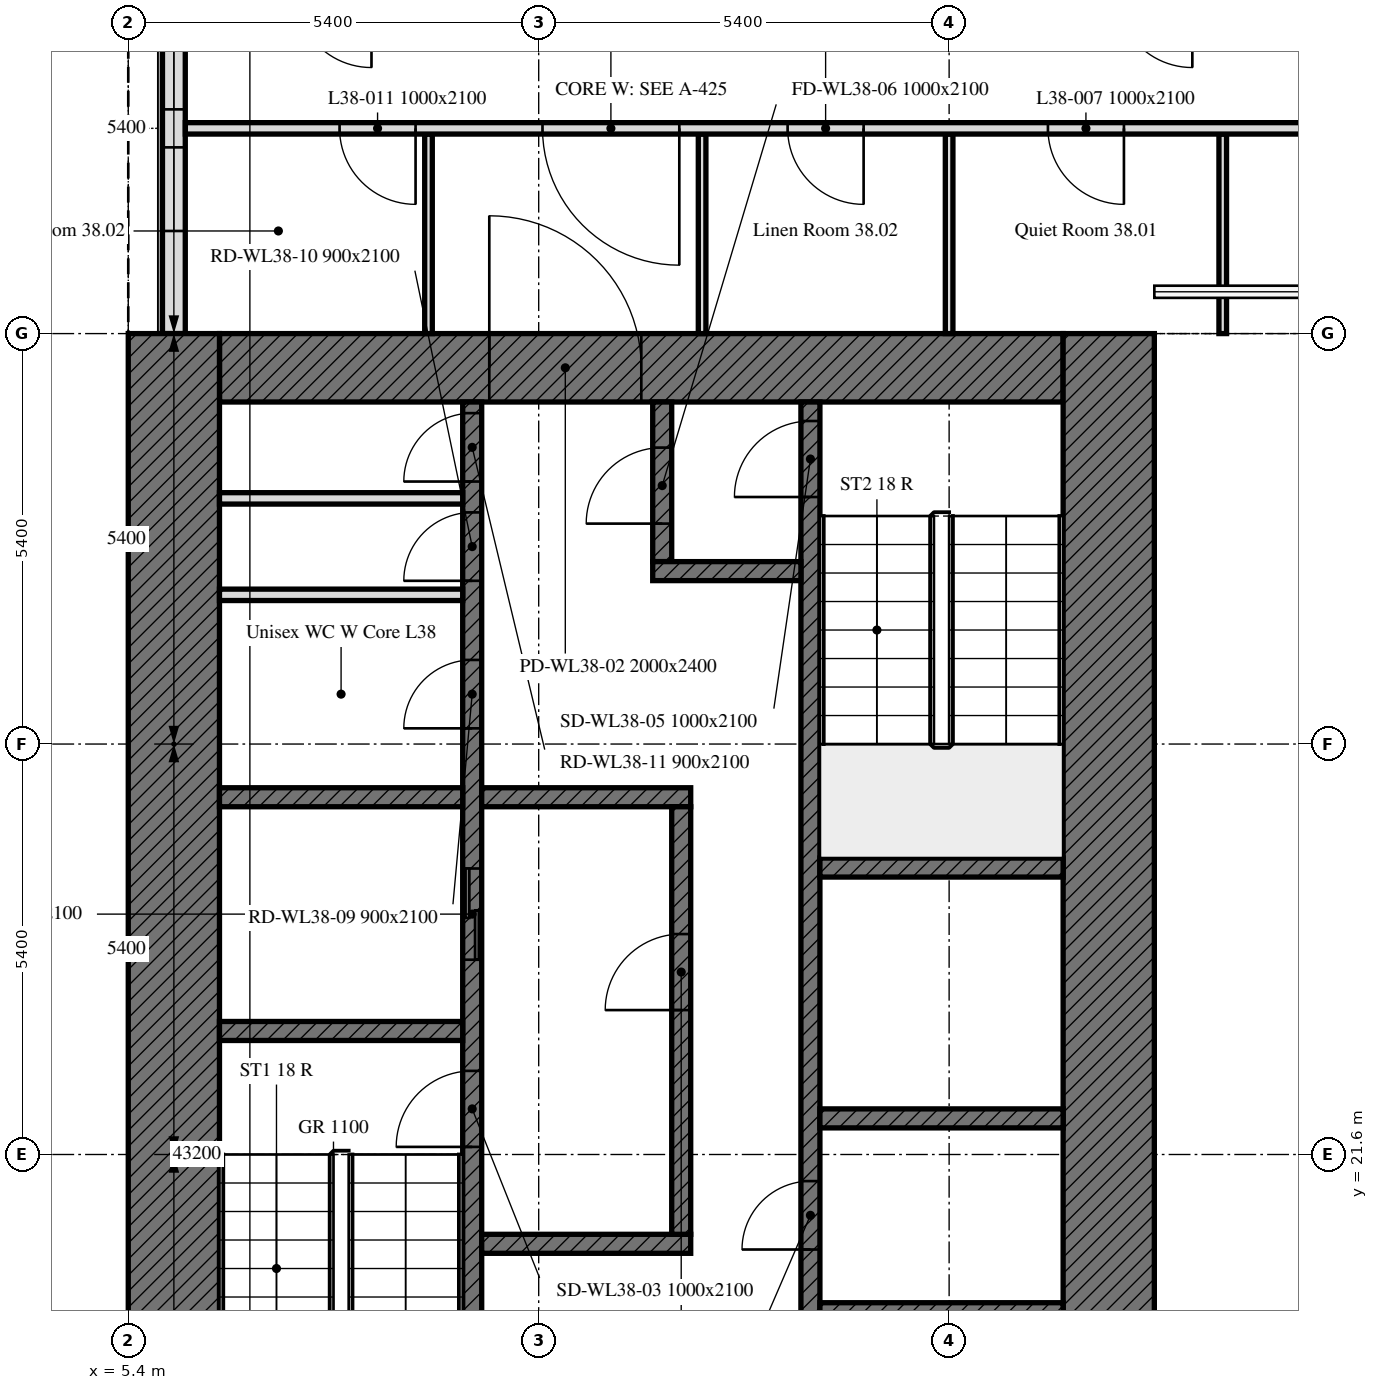
"""IFC4 building model, lengths in metres.
Left out: names, types, materials, properties, quantities, classifications, styles, units other than length and angle.
Written with IfcOpenShell. Run it as: python <this file> out.ifc"""

import sys

from ifc_helpers import new_model, si_unit, direction, frame, frame_2d, origin, place, context, subcontext, project, spatial, rectangle, extrude, element, fill, save


model = new_model("IFC4")
c1 = context("Model", 3, precision=1e-05, world=origin(), true_north=direction((0.0, 1.0)))
c2 = subcontext(c1, "Body", "Model", "MODEL_VIEW")
j1 = project(units=[si_unit("LENGTHUNIT", "METRE"), si_unit("PLANEANGLEUNIT", "RADIAN")], contexts=[c1])
p1 = place(None, origin())
s1 = spatial("IfcSite", under=j1, at=p1, CompositionType="ELEMENT")
p2 = place(p1, origin())
s2 = spatial("IfcBuilding", under=s1, at=p2, CompositionType="ELEMENT")
p3 = place(p2, frame((0.0, 0.0, 162.7)))
s3 = spatial("IfcBuildingStorey", under=s2, at=p3, CompositionType="ELEMENT", Elevation=162.7)
p4 = place(p3, frame((6.0, 37.614, 0.0), z_axis=(0.0, 0.0, 1.0), x_axis=(0.0, -1.0, 0.0)))
e1 = element("IfcWall", 1, at=p4, inside=s3, PredefinedType="SOLIDWALL", context=c2, shape_type="SweptSolid", body=[
    extrude(rectangle(XDim=5.214, YDim=0.3, at=frame_2d((2.607, 0.0))), origin(), (0.0, 0.0, 1.0), 3.0),
])
p5 = place(p4, frame((1.164, 0.0, 0.9)))
e2 = element("IfcOpeningElement", 2, at=p5, cuts=e1, PredefinedType="OPENING", context=c2, shape_type="SweptSolid", body=[
    extrude(rectangle(XDim=1.1, YDim=1.7, at=frame_2d((0.55, 0.85))), frame((0.0, 0.16, 0.0), z_axis=(0.0, -1.0, 0.0), x_axis=(1.0, 0.0, 0.0)), (0.0, 0.0, 1.0), 0.32),
])
p6 = place(p4, frame((2.764, 0.0, 0.9)))
e3 = element("IfcOpeningElement", 3, at=p6, cuts=e1, PredefinedType="OPENING", context=c2, shape_type="SweptSolid", body=[
    extrude(rectangle(XDim=1.1, YDim=1.7, at=frame_2d((0.55, 0.85))), frame((0.0, 0.16, 0.0), z_axis=(0.0, -1.0, 0.0), x_axis=(1.0, 0.0, 0.0)), (0.0, 0.0, 1.0), 0.32),
])
p7 = place(p3, frame((6.6, 31.95, 0.0), z_axis=(0.0, 0.0, 1.0), x_axis=(1.0, 0.0, 0.0)))
e4 = element("IfcWall", 4, at=p7, inside=s3, PredefinedType="SOLIDWALL", context=c2, shape_type="SweptSolid", body=[
    extrude(rectangle(XDim=11.1, YDim=0.9, at=frame_2d((5.55, 0.0))), origin(), (0.0, 0.0, 1.0), 3.0),
])
p8 = place(p7, frame((3.55, 0.0, 0.0)))
e5 = element("IfcOpeningElement", 5, at=p8, cuts=e4, PredefinedType="OPENING", context=c2, shape_type="SweptSolid", body=[
    extrude(rectangle(XDim=2.0, YDim=2.4, at=frame_2d((1.0, 1.2))), frame((0.0, 0.45, 0.0), z_axis=(0.0, -1.0, 0.0), x_axis=(1.0, 0.0, 0.0)), (0.0, 0.0, 1.0), 0.9),
])
for number, where, z_axis, x_axis in (
    (6, (6.0, 16.2, 0.0), (0.0, 0.0, 1.0), (0.0, 1.0, 0.0)),
    (7, (18.3, 32.4, 0.0), (0.0, 0.0, 1.0), (0.0, -1.0, 0.0)),
):
    element("IfcWall", number, at=place(p3, frame(where, z_axis=z_axis, x_axis=x_axis)), inside=s3, PredefinedType="SOLIDWALL", context=c2, shape_type="SweptSolid", body=[
        extrude(rectangle(XDim=16.2, YDim=1.2, at=frame_2d((8.1, 0.0))), origin(), (0.0, 0.0, 1.0), 3.0),
    ])
p9 = place(p3, frame((9.925, 17.1, 0.0), z_axis=(0.0, 0.0, 1.0), x_axis=(0.0, 1.0, 0.0)))
e8 = element("IfcWall", 8, at=p9, inside=s3, PredefinedType="SOLIDWALL", context=c2, shape_type="SweptSolid", body=[
    extrude(rectangle(XDim=14.4, YDim=0.25, at=frame_2d((7.2, 0.0))), origin(), (0.0, 0.0, 1.0), 3.0),
])
p10 = place(p9, frame((4.6, 0.0, 0.0)))
e9 = element("IfcOpeningElement", 9, at=p10, cuts=e8, PredefinedType="OPENING", context=c2, shape_type="SweptSolid", body=[
    extrude(rectangle(XDim=1.0, YDim=2.1, at=frame_2d((0.5, 1.05))), frame((0.0, 0.125, 0.0), z_axis=(0.0, -1.0, 0.0), x_axis=(1.0, 0.0, 0.0)), (0.0, 0.0, 1.0), 0.25),
])
p11 = place(p9, frame((7.062, 0.0, 0.0)))
e10 = element("IfcOpeningElement", 10, at=p11, cuts=e8, PredefinedType="OPENING", context=c2, shape_type="SweptSolid", body=[
    extrude(rectangle(XDim=1.2, YDim=2.1, at=frame_2d((0.6, 1.05))), frame((0.0, 0.125, 0.0), z_axis=(0.0, -1.0, 0.0), x_axis=(1.0, 0.0, 0.0)), (0.0, 0.0, 1.0), 0.25),
])
p12 = place(p9, frame((10.106, 0.0, 0.0)))
e11 = element("IfcOpeningElement", 11, at=p12, cuts=e8, PredefinedType="OPENING", context=c2, shape_type="SweptSolid", body=[
    extrude(rectangle(XDim=0.9, YDim=2.1, at=frame_2d((0.45, 1.05))), frame((0.0, 0.125, 0.0), z_axis=(0.0, -1.0, 0.0), x_axis=(1.0, 0.0, 0.0)), (0.0, 0.0, 1.0), 0.25),
])
p13 = place(p9, frame((12.048, 0.0, 0.0)))
e12 = element("IfcOpeningElement", 12, at=p13, cuts=e8, PredefinedType="OPENING", context=c2, shape_type="SweptSolid", body=[
    extrude(rectangle(XDim=0.9, YDim=2.1, at=frame_2d((0.45, 1.05))), frame((0.0, 0.125, 0.0), z_axis=(0.0, -1.0, 0.0), x_axis=(1.0, 0.0, 0.0)), (0.0, 0.0, 1.0), 0.25),
])
p14 = place(p9, frame((13.354, 0.0, 0.0)))
e13 = element("IfcOpeningElement", 13, at=p14, cuts=e8, PredefinedType="OPENING", context=c2, shape_type="SweptSolid", body=[
    extrude(rectangle(XDim=0.9, YDim=2.1, at=frame_2d((0.45, 1.05))), frame((0.0, 0.125, 0.0), z_axis=(0.0, -1.0, 0.0), x_axis=(1.0, 0.0, 0.0)), (0.0, 0.0, 1.0), 0.25),
])
p15 = place(p3, frame((14.375, 17.1, 0.0), z_axis=(0.0, 0.0, 1.0), x_axis=(0.0, 1.0, 0.0)))
e14 = element("IfcWall", 14, at=p15, inside=s3, PredefinedType="SOLIDWALL", context=c2, shape_type="SweptSolid", body=[
    extrude(rectangle(XDim=14.4, YDim=0.25, at=frame_2d((7.2, 0.0))), origin(), (0.0, 0.0, 1.0), 3.0),
])
p16 = place(p15, frame((13.15, 0.0, 0.0)))
e15 = element("IfcOpeningElement", 15, at=p16, cuts=e14, PredefinedType="OPENING", context=c2, shape_type="SweptSolid", body=[
    extrude(rectangle(XDim=1.0, YDim=2.1, at=frame_2d((0.5, 1.05))), frame((0.0, 0.125, 0.0), z_axis=(0.0, -1.0, 0.0), x_axis=(1.0, 0.0, 0.0)), (0.0, 0.0, 1.0), 0.25),
])
p17 = place(p15, frame((0.6, 0.0, 0.0)))
e16 = element("IfcOpeningElement", 16, at=p17, cuts=e14, PredefinedType="OPENING", context=c2, shape_type="SweptSolid", body=[
    extrude(rectangle(XDim=1.1, YDim=2.1, at=frame_2d((0.55, 1.05))), frame((0.0, 0.125, 0.0), z_axis=(0.0, -1.0, 0.0), x_axis=(1.0, 0.0, 0.0)), (0.0, 0.0, 1.0), 0.25),
])
p18 = place(p15, frame((3.25, 0.0, 0.0)))
e17 = element("IfcOpeningElement", 17, at=p18, cuts=e14, PredefinedType="OPENING", context=c2, shape_type="SweptSolid", body=[
    extrude(rectangle(XDim=0.9, YDim=2.1, at=frame_2d((0.45, 1.05))), frame((0.0, 0.125, 0.0), z_axis=(0.0, -1.0, 0.0), x_axis=(1.0, 0.0, 0.0)), (0.0, 0.0, 1.0), 0.25),
])
for number, where, z_axis, x_axis in (
    (18, (6.6, 23.225, 0.0), (0.0, 0.0, 1.0), (1.0, 0.0, 0.0)),
    (19, (14.5, 25.375, 0.0), (0.0, 0.0, 1.0), (1.0, 0.0, 0.0)),
    (20, (14.5, 22.075, 0.0), (0.0, 0.0, 1.0), (1.0, 0.0, 0.0)),
    (21, (6.6, 26.3, 0.0), (0.0, 0.0, 1.0), (1.0, 0.0, 0.0)),
):
    element("IfcWall", number, at=place(p3, frame(where, z_axis=z_axis, x_axis=x_axis)), inside=s3, PredefinedType="SOLIDWALL", context=c2, shape_type="SweptSolid", body=[
        extrude(rectangle(XDim=3.2, YDim=0.25, at=frame_2d((1.6, 0.0))), origin(), (0.0, 0.0, 1.0), 3.0),
    ])
for number, where, z_axis, x_axis in (
    (22, (10.05, 26.3, 0.0), (0.0, 0.0, 1.0), (1.0, 0.0, 0.0)),
    (23, (10.05, 20.425, 0.0), (0.0, 0.0, 1.0), (1.0, 0.0, 0.0)),
):
    element("IfcWall", number, at=place(p3, frame(where, z_axis=z_axis, x_axis=x_axis)), inside=s3, PredefinedType="SOLIDWALL", context=c2, shape_type="SweptSolid", body=[
        extrude(rectangle(XDim=2.75, YDim=0.25, at=frame_2d((1.375, 0.0))), origin(), (0.0, 0.0, 1.0), 3.0),
    ])
p19 = place(p3, frame((12.425, 29.4, 0.0), z_axis=(0.0, 0.0, 1.0), x_axis=(0.0, 1.0, 0.0)))
e24 = element("IfcWall", 24, at=p19, inside=s3, PredefinedType="SOLIDWALL", context=c2, shape_type="SweptSolid", body=[
    extrude(rectangle(XDim=2.1, YDim=0.25, at=frame_2d((1.05, 0.0))), origin(), (0.0, 0.0, 1.0), 3.0),
])
p20 = place(p19, frame((0.5, 0.0, 0.0)))
e25 = element("IfcOpeningElement", 25, at=p20, cuts=e24, PredefinedType="OPENING", context=c2, shape_type="SweptSolid", body=[
    extrude(rectangle(XDim=1.0, YDim=2.1, at=frame_2d((0.5, 1.05))), frame((0.0, 0.125, 0.0), z_axis=(0.0, -1.0, 0.0), x_axis=(1.0, 0.0, 0.0)), (0.0, 0.0, 1.0), 0.25),
])
p21 = place(p3, frame((12.3, 29.275, 0.0), z_axis=(0.0, 0.0, 1.0), x_axis=(1.0, 0.0, 0.0)))
e26 = element("IfcWall", 26, at=p21, inside=s3, PredefinedType="SOLIDWALL", context=c2, shape_type="SweptSolid", body=[
    extrude(rectangle(XDim=1.95, YDim=0.25, at=frame_2d((0.975, 0.0))), origin(), (0.0, 0.0, 1.0), 3.0),
])
p22 = place(p3, frame((12.675, 20.55, 0.0), z_axis=(0.0, 0.0, 1.0), x_axis=(0.0, 1.0, 0.0)))
e27 = element("IfcWall", 27, at=p22, inside=s3, PredefinedType="SOLIDWALL", context=c2, shape_type="SweptSolid", body=[
    extrude(rectangle(XDim=5.625, YDim=0.25, at=frame_2d((2.812, 0.0))), origin(), (0.0, 0.0, 1.0), 3.0),
])
p23 = place(p22, frame((2.95, 0.0, 0.0)))
e28 = element("IfcOpeningElement", 28, at=p23, cuts=e27, PredefinedType="OPENING", context=c2, shape_type="SweptSolid", body=[
    extrude(rectangle(XDim=1.0, YDim=2.1, at=frame_2d((0.5, 1.05))), frame((0.0, 0.125, 0.0), z_axis=(0.0, -1.0, 0.0), x_axis=(1.0, 0.0, 0.0)), (0.0, 0.0, 1.0), 0.25),
])
p24 = place(p3, frame((14.5, 19.525, 0.0), z_axis=(0.0, 0.0, 1.0), x_axis=(1.0, 0.0, 0.0)))
e29 = element("IfcWall", 29, at=p24, inside=s3, PredefinedType="SOLIDWALL", context=c2, shape_type="SweptSolid", body=[
    extrude(rectangle(XDim=3.2, YDim=0.25, at=frame_2d((1.6, 0.0))), origin(), (0.0, 0.0, 1.0), 3.0),
])
for number, where, z_axis, x_axis in (
    (30, (6.6, 28.963, 0.0), (0.0, 0.0, 1.0), (1.0, 0.0, 0.0)),
    (31, (6.6, 30.232, 0.0), (0.0, 0.0, 1.0), (1.0, 0.0, 0.0)),
):
    element("IfcWall", number, at=place(p3, frame(where, z_axis=z_axis, x_axis=x_axis)), inside=s3, PredefinedType="PARTITIONING", context=c2, shape_type="SweptSolid", body=[
        extrude(rectangle(XDim=3.2, YDim=0.15, at=frame_2d((1.6, 0.0))), origin(), (0.0, 0.0, 1.0), 3.0),
    ])
for number, where, z_axis, x_axis in (
    (32, (16.2, 35.025, 0.0), (0.0, 0.0, 1.0), (0.0, -1.0, 0.0)),
    (33, (19.8, 32.4, 0.0), (0.0, 0.0, 1.0), (0.0, 1.0, 0.0)),
    (34, (9.35, 35.025, 0.0), (0.0, 0.0, 1.0), (0.0, -1.0, 0.0)),
    (35, (12.95, 32.4, 0.0), (0.0, 0.0, 1.0), (0.0, 1.0, 0.0)),
):
    element("IfcWall", number, at=place(p3, frame(where, z_axis=z_axis, x_axis=x_axis)), inside=s3, PredefinedType="PARTITIONING", context=c2, shape_type="SweptSolid", body=[
        extrude(rectangle(XDim=2.625, YDim=0.1, at=frame_2d((1.312, 0.0))), origin(), (0.0, 0.0, 1.0), 3.0),
    ])
p25 = place(p3, frame((43.275, 35.1, 0.0), z_axis=(0.0, 0.0, 1.0), x_axis=(-1.0, 0.0, 0.0)))
e36 = element("IfcWall", 36, at=p25, inside=s3, PredefinedType="PARTITIONING", context=c2, shape_type="SweptSolid", body=[
    extrude(rectangle(XDim=37.124, YDim=0.15, at=frame_2d((18.562, 0.0))), origin(), (0.0, 0.0, 1.0), 3.0),
])
p26 = place(p25, frame((24.775, 0.0, 0.0)))
e37 = element("IfcOpeningElement", 37, at=p26, cuts=e36, PredefinedType="OPENING", context=c2, shape_type="SweptSolid", body=[
    extrude(rectangle(XDim=1.0, YDim=2.1, at=frame_2d((0.5, 1.05))), frame((0.0, 0.075, 0.0), z_axis=(0.0, -1.0, 0.0), x_axis=(1.0, 0.0, 0.0)), (0.0, 0.0, 1.0), 0.15),
])
p27 = place(p25, frame((18.475, 0.0, 0.0)))
e38 = element("IfcOpeningElement", 38, at=p27, cuts=e36, PredefinedType="OPENING", context=c2, shape_type="SweptSolid", body=[
    extrude(rectangle(XDim=1.0, YDim=2.1, at=frame_2d((0.5, 1.05))), frame((0.0, 0.075, 0.0), z_axis=(0.0, -1.0, 0.0), x_axis=(1.0, 0.0, 0.0)), (0.0, 0.0, 1.0), 0.15),
])
p28 = place(p25, frame((13.525, 0.0, 0.0)))
e39 = element("IfcOpeningElement", 39, at=p28, cuts=e36, PredefinedType="OPENING", context=c2, shape_type="SweptSolid", body=[
    extrude(rectangle(XDim=1.0, YDim=2.1, at=frame_2d((0.5, 1.05))), frame((0.0, 0.075, 0.0), z_axis=(0.0, -1.0, 0.0), x_axis=(1.0, 0.0, 0.0)), (0.0, 0.0, 1.0), 0.15),
])
p29 = place(p25, frame((34.095, 0.0, 0.0)))
e40 = element("IfcOpeningElement", 40, at=p29, cuts=e36, PredefinedType="OPENING", context=c2, shape_type="SweptSolid", body=[
    extrude(rectangle(XDim=1.0, YDim=2.1, at=frame_2d((0.5, 1.05))), frame((0.0, 0.075, 0.0), z_axis=(0.0, -1.0, 0.0), x_axis=(1.0, 0.0, 0.0)), (0.0, 0.0, 1.0), 0.15),
])
p30 = place(p25, frame((8.75, 0.0, 0.0)))
e41 = element("IfcOpeningElement", 41, at=p30, cuts=e36, PredefinedType="OPENING", context=c2, shape_type="SweptSolid", body=[
    extrude(rectangle(XDim=1.0, YDim=2.1, at=frame_2d((0.5, 1.05))), frame((0.0, 0.075, 0.0), z_axis=(0.0, -1.0, 0.0), x_axis=(1.0, 0.0, 0.0)), (0.0, 0.0, 1.0), 0.15),
])
p31 = place(p25, frame((1.55, 0.0, 0.0)))
e42 = element("IfcOpeningElement", 42, at=p31, cuts=e36, PredefinedType="OPENING", context=c2, shape_type="SweptSolid", body=[
    extrude(rectangle(XDim=1.0, YDim=2.1, at=frame_2d((0.5, 1.05))), frame((0.0, 0.075, 0.0), z_axis=(0.0, -1.0, 0.0), x_axis=(1.0, 0.0, 0.0)), (0.0, 0.0, 1.0), 0.15),
])
p32 = place(p25, frame((28.2, 0.0, 0.0)))
e43 = element("IfcOpeningElement", 43, at=p32, cuts=e36, PredefinedType="OPENING", context=c2, shape_type="SweptSolid", body=[
    extrude(rectangle(XDim=1.0, YDim=2.1, at=frame_2d((0.5, 1.05))), frame((0.0, 0.075, 0.0), z_axis=(0.0, -1.0, 0.0), x_axis=(1.0, 0.0, 0.0)), (0.0, 0.0, 1.0), 0.15),
])
p33 = place(p25, frame((30.625, 0.0, 0.0)))
e44 = element("IfcOpeningElement", 44, at=p33, cuts=e36, PredefinedType="OPENING", context=c2, shape_type="SweptSolid", body=[
    extrude(rectangle(XDim=1.8, YDim=2.4, at=frame_2d((0.9, 1.2))), frame((0.0, 0.075, 0.0), z_axis=(0.0, -1.0, 0.0), x_axis=(1.0, 0.0, 0.0)), (0.0, 0.0, 1.0), 0.15),
])
p34 = place(p25, frame((5.525, 0.0, 0.0)))
e45 = element("IfcOpeningElement", 45, at=p34, cuts=e36, PredefinedType="OPENING", context=c2, shape_type="SweptSolid", body=[
    extrude(rectangle(XDim=1.8, YDim=2.4, at=frame_2d((0.9, 1.2))), frame((0.0, 0.075, 0.0), z_axis=(0.0, -1.0, 0.0), x_axis=(1.0, 0.0, 0.0)), (0.0, 0.0, 1.0), 0.15),
])
p35 = place(p5, origin())
e46 = element("IfcWindow", 46, at=p35, inside=s3, PartitioningType="SINGLE_PANEL", PredefinedType="WINDOW", context=c2, shape_type="SweptSolid", body=[
    extrude(rectangle(XDim=1.1, YDim=1.7, at=frame_2d((0.55, 0.85))), frame((0.0, 0.03, 0.0), z_axis=(0.0, -1.0, 0.0), x_axis=(1.0, 0.0, 0.0)), (0.0, 0.0, 1.0), 0.06),
])
fill(e2, e46)
p36 = place(p6, origin())
e47 = element("IfcWindow", 47, at=p36, inside=s3, PartitioningType="SINGLE_PANEL", PredefinedType="WINDOW", context=c2, shape_type="SweptSolid", body=[
    extrude(rectangle(XDim=1.1, YDim=1.7, at=frame_2d((0.55, 0.85))), frame((0.0, 0.03, 0.0), z_axis=(0.0, -1.0, 0.0), x_axis=(1.0, 0.0, 0.0)), (0.0, 0.0, 1.0), 0.06),
])
fill(e3, e47)
p37 = place(p8, origin())
e48 = element("IfcDoor", 48, at=p37, inside=s3, OperationType="DOUBLE_DOOR_SINGLE_SWING", PredefinedType="DOOR", context=c2, shape_type="SweptSolid", body=[
    extrude(rectangle(XDim=2.0, YDim=2.4, at=frame_2d((1.0, 1.2))), frame((0.0, 0.025, 0.0), z_axis=(0.0, -1.0, 0.0), x_axis=(1.0, 0.0, 0.0)), (0.0, 0.0, 1.0), 0.05),
])
fill(e5, e48)
p38 = place(p10, origin())
e49 = element("IfcDoor", 49, at=p38, inside=s3, OperationType="SINGLE_SWING_LEFT", PredefinedType="DOOR", context=c2, shape_type="SweptSolid", body=[
    extrude(rectangle(XDim=1.0, YDim=2.1, at=frame_2d((0.5, 1.05))), frame((0.0, 0.025, 0.0), z_axis=(0.0, -1.0, 0.0), x_axis=(1.0, 0.0, 0.0)), (0.0, 0.0, 1.0), 0.05),
])
fill(e9, e49)
p39 = place(p23, origin())
e50 = element("IfcDoor", 50, at=p39, inside=s3, OperationType="SINGLE_SWING_LEFT", PredefinedType="DOOR", context=c2, shape_type="SweptSolid", body=[
    extrude(rectangle(XDim=1.0, YDim=2.1, at=frame_2d((0.5, 1.05))), frame((0.0, 0.025, 0.0), z_axis=(0.0, -1.0, 0.0), x_axis=(1.0, 0.0, 0.0)), (0.0, 0.0, 1.0), 0.05),
])
fill(e28, e50)
p40 = place(p16, origin())
e51 = element("IfcDoor", 51, at=p40, inside=s3, OperationType="SINGLE_SWING_LEFT", PredefinedType="DOOR", context=c2, shape_type="SweptSolid", body=[
    extrude(rectangle(XDim=1.0, YDim=2.1, at=frame_2d((0.5, 1.05))), frame((0.0, 0.025, 0.0), z_axis=(0.0, -1.0, 0.0), x_axis=(1.0, 0.0, 0.0)), (0.0, 0.0, 1.0), 0.05),
])
fill(e15, e51)
p41 = place(p20, origin())
e52 = element("IfcDoor", 52, at=p41, inside=s3, OperationType="SINGLE_SWING_LEFT", PredefinedType="DOOR", context=c2, shape_type="SweptSolid", body=[
    extrude(rectangle(XDim=1.0, YDim=2.1, at=frame_2d((0.5, 1.05))), frame((0.0, 0.025, 0.0), z_axis=(0.0, -1.0, 0.0), x_axis=(1.0, 0.0, 0.0)), (0.0, 0.0, 1.0), 0.05),
])
fill(e25, e52)
p42 = place(p11, origin())
e53 = element("IfcDoor", 53, at=p42, inside=s3, OperationType="DOUBLE_DOOR_SLIDING", PredefinedType="DOOR", context=c2, shape_type="SweptSolid", body=[
    extrude(rectangle(XDim=1.2, YDim=2.1, at=frame_2d((0.6, 1.05))), frame((0.0, 0.025, 0.0), z_axis=(0.0, -1.0, 0.0), x_axis=(1.0, 0.0, 0.0)), (0.0, 0.0, 1.0), 0.05),
])
fill(e10, e53)
p43 = place(p12, origin())
e54 = element("IfcDoor", 54, at=p43, inside=s3, OperationType="SINGLE_SWING_LEFT", PredefinedType="DOOR", context=c2, shape_type="SweptSolid", body=[
    extrude(rectangle(XDim=0.9, YDim=2.1, at=frame_2d((0.45, 1.05))), frame((0.0, 0.025, 0.0), z_axis=(0.0, -1.0, 0.0), x_axis=(1.0, 0.0, 0.0)), (0.0, 0.0, 1.0), 0.05),
])
fill(e11, e54)
p44 = place(p13, origin())
e55 = element("IfcDoor", 55, at=p44, inside=s3, OperationType="SINGLE_SWING_LEFT", PredefinedType="DOOR", context=c2, shape_type="SweptSolid", body=[
    extrude(rectangle(XDim=0.9, YDim=2.1, at=frame_2d((0.45, 1.05))), frame((0.0, 0.025, 0.0), z_axis=(0.0, -1.0, 0.0), x_axis=(1.0, 0.0, 0.0)), (0.0, 0.0, 1.0), 0.05),
])
fill(e12, e55)
p45 = place(p14, origin())
e56 = element("IfcDoor", 56, at=p45, inside=s3, OperationType="SINGLE_SWING_LEFT", PredefinedType="DOOR", context=c2, shape_type="SweptSolid", body=[
    extrude(rectangle(XDim=0.9, YDim=2.1, at=frame_2d((0.45, 1.05))), frame((0.0, 0.025, 0.0), z_axis=(0.0, -1.0, 0.0), x_axis=(1.0, 0.0, 0.0)), (0.0, 0.0, 1.0), 0.05),
])
fill(e13, e56)
p46 = place(p18, origin())
e57 = element("IfcDoor", 57, at=p46, inside=s3, OperationType="SINGLE_SWING_LEFT", PredefinedType="DOOR", context=c2, shape_type="SweptSolid", body=[
    extrude(rectangle(XDim=0.9, YDim=2.1, at=frame_2d((0.45, 1.05))), frame((0.0, 0.025, 0.0), z_axis=(0.0, -1.0, 0.0), x_axis=(1.0, 0.0, 0.0)), (0.0, 0.0, 1.0), 0.05),
])
fill(e17, e57)
p47 = place(p26, origin())
e58 = element("IfcDoor", 58, at=p47, inside=s3, OperationType="SINGLE_SWING_RIGHT", PredefinedType="DOOR", context=c2, shape_type="SweptSolid", body=[
    extrude(rectangle(XDim=1.0, YDim=2.1, at=frame_2d((0.5, 1.05))), frame((0.0, 0.025, 0.0), z_axis=(0.0, -1.0, 0.0), x_axis=(1.0, 0.0, 0.0)), (0.0, 0.0, 1.0), 0.05),
])
fill(e37, e58)
p48 = place(p29, origin())
e59 = element("IfcDoor", 59, at=p48, inside=s3, OperationType="SINGLE_SWING_LEFT", PredefinedType="DOOR", context=c2, shape_type="SweptSolid", body=[
    extrude(rectangle(XDim=1.0, YDim=2.1, at=frame_2d((0.5, 1.05))), frame((0.0, 0.025, 0.0), z_axis=(0.0, -1.0, 0.0), x_axis=(1.0, 0.0, 0.0)), (0.0, 0.0, 1.0), 0.05),
])
fill(e40, e59)
p49 = place(p32, origin())
e60 = element("IfcDoor", 60, at=p49, inside=s3, OperationType="SINGLE_SWING_RIGHT", PredefinedType="DOOR", context=c2, shape_type="SweptSolid", body=[
    extrude(rectangle(XDim=1.0, YDim=2.1, at=frame_2d((0.5, 1.05))), frame((0.0, 0.025, 0.0), z_axis=(0.0, -1.0, 0.0), x_axis=(1.0, 0.0, 0.0)), (0.0, 0.0, 1.0), 0.05),
])
fill(e43, e60)
p50 = place(p33, origin())
e61 = element("IfcDoor", 61, at=p50, inside=s3, OperationType="DOUBLE_DOOR_SINGLE_SWING", PredefinedType="DOOR", context=c2, shape_type="SweptSolid", body=[
    extrude(rectangle(XDim=1.8, YDim=2.4, at=frame_2d((0.9, 1.2))), frame((0.0, 0.025, 0.0), z_axis=(0.0, -1.0, 0.0), x_axis=(1.0, 0.0, 0.0)), (0.0, 0.0, 1.0), 0.05),
])
fill(e44, e61)
save(model, sys.argv[1])
